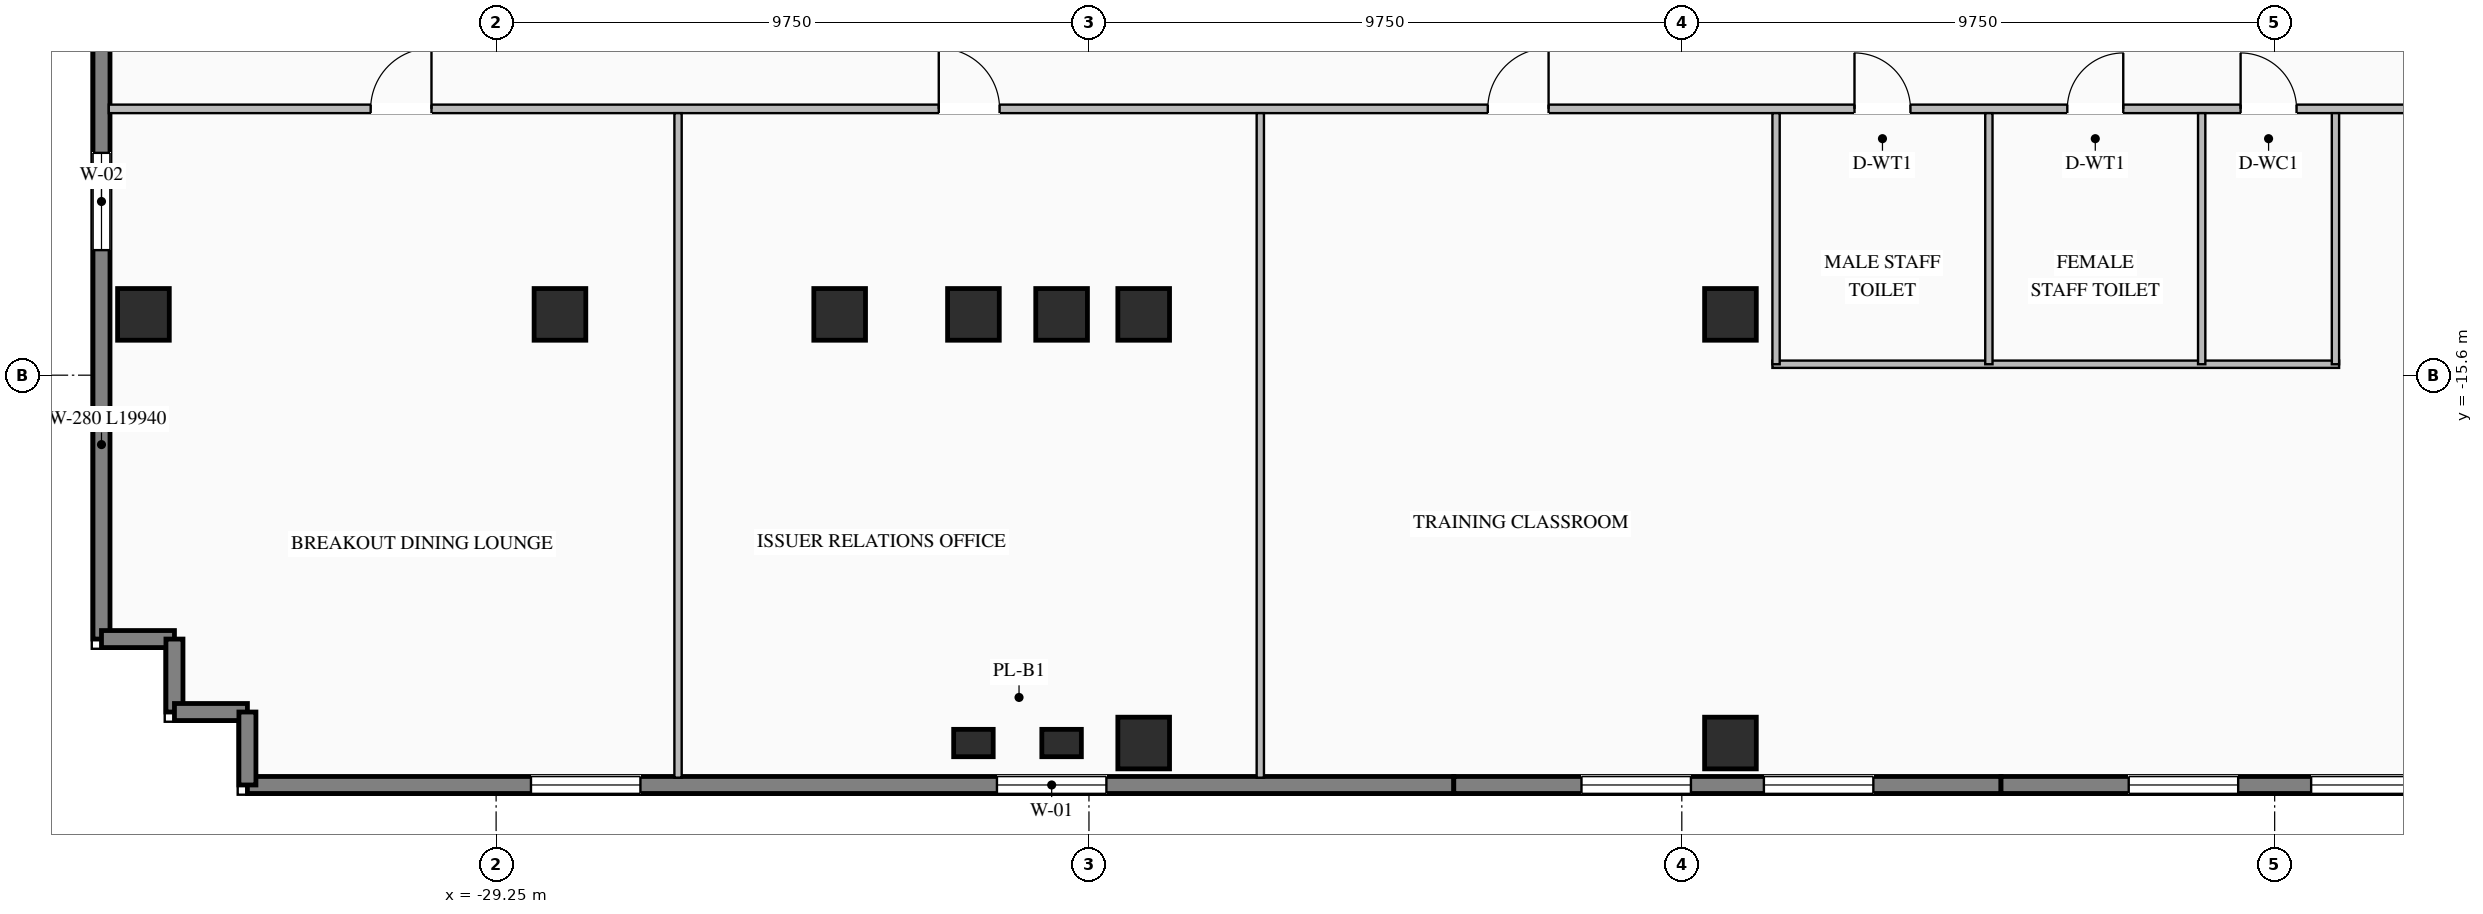
"""IFC4 building model, lengths in metres.
Left out: names, types, materials, properties, quantities, classifications, styles, units other than length and angle.
Written with IfcOpenShell. Run it as: python <this file> out.ifc"""

import sys

from ifc_helpers import new_model, si_unit, direction, frame, frame_2d, origin, origin_2d, place, context, subcontext, project, spatial, rectangle, i_section, extrude, element, fill, save


model = new_model("IFC4")
c1 = context("Model", 3, precision=1e-05, world=origin(), true_north=direction((0.0, 1.0)))
c2 = subcontext(c1, "Body", "Model", "MODEL_VIEW")
j1 = project(units=[si_unit("LENGTHUNIT", "METRE"), si_unit("PLANEANGLEUNIT", "RADIAN")], contexts=[c1])
p1 = place(None, origin())
s1 = spatial("IfcSite", under=j1, at=p1, CompositionType="ELEMENT")
p2 = place(p1, origin())
s2 = spatial("IfcBuilding", under=s1, at=p2, CompositionType="ELEMENT")
p3 = place(p2, frame((0.0, 0.0, 51.9)))
s3 = spatial("IfcBuildingStorey", under=s2, at=p3, CompositionType="ELEMENT", Elevation=51.9)
for number, where, z_axis, x_axis in (
    (1, (-21.4, -14.6, 0.0), (0.0, 0.0, 1.0), (1.0, 0.0, 0.0)),
    (2, (-19.95, -14.6, 0.0), (0.0, 0.0, 1.0), (1.0, 0.0, 0.0)),
    (3, (-18.6, -14.6, 0.0), (0.0, 0.0, 1.0), (1.0, 0.0, 0.0)),
    (4, (-8.95, -14.6, 0.0), (0.0, 0.0, 1.0), (1.0, 0.0, 0.0)),
    (5, (-23.6, -14.6, 0.0), (0.0, 0.0, 1.0), (1.0, 0.0, 0.0)),
    (6, (-28.2, -14.6, 0.0), (0.0, 0.0, 1.0), (1.0, 0.0, 0.0)),
    (7, (-18.6, -21.65, 0.0), (0.0, 0.0, 1.0), (1.0, 0.0, 0.0)),
    (8, (-8.95, -21.65, 0.0), (0.0, 0.0, 1.0), (1.0, 0.0, 0.0)),
    (9, (-35.05, -14.6, 0.0), (0.0, 0.0, 1.0), (1.0, 0.0, 0.0)),
):
    element("IfcColumn", number, at=place(p3, frame(where, z_axis=z_axis, x_axis=x_axis)), inside=s3, PredefinedType="COLUMN", context=c2, shape_type="SweptSolid", body=[
        extrude(i_section(OverallWidth=0.85, OverallDepth=0.85, WebThickness=0.032, FlangeThickness=0.048, at=origin_2d()), origin(), (0.0, 0.0, 1.0), 3.45),
    ])
for number, where, z_axis, x_axis in (
    (10, (-21.4, -21.65, 0.0), (0.0, 0.0, 1.0), (1.0, 0.0, 0.0)),
    (11, (-19.95, -21.65, 0.0), (0.0, 0.0, 1.0), (1.0, 0.0, 0.0)),
):
    element("IfcColumn", number, at=place(p3, frame(where, z_axis=z_axis, x_axis=x_axis)), inside=s3, PredefinedType="PILASTER", context=c2, shape_type="SweptSolid", body=[
        extrude(rectangle(XDim=0.65, YDim=0.45, at=origin_2d()), origin(), (0.0, 0.0, 1.0), 3.45),
    ])
p4 = place(p3, frame((-13.5, -22.34, 0.0), z_axis=(0.0, 0.0, 1.0), x_axis=(-1.0, 0.0, 0.0)))
e12 = element("IfcWall", 12, at=p4, inside=s3, PredefinedType="STANDARD", context=c2, shape_type="SweptSolid", body=[
    extrude(rectangle(XDim=19.84, YDim=0.28, at=frame_2d((9.92, 0.0))), origin(), (0.0, 0.0, 1.0), 3.25),
])
p5 = place(p4, frame((5.713, 0.0, 0.76)))
e13 = element("IfcOpeningElement", 13, at=p5, cuts=e12, PredefinedType="OPENING", context=c2, shape_type="SweptSolid", body=[
    extrude(rectangle(XDim=1.8, YDim=1.95, at=frame_2d((0.9, 0.975))), frame((0.0, 0.15, 0.0), z_axis=(0.0, -1.0, 0.0), x_axis=(1.0, 0.0, 0.0)), (0.0, 0.0, 1.0), 0.3),
])
p6 = place(p4, frame((13.377, 0.0, 0.76)))
e14 = element("IfcOpeningElement", 14, at=p6, cuts=e12, PredefinedType="OPENING", context=c2, shape_type="SweptSolid", body=[
    extrude(rectangle(XDim=1.8, YDim=1.95, at=frame_2d((0.9, 0.975))), frame((0.0, 0.15, 0.0), z_axis=(0.0, -1.0, 0.0), x_axis=(1.0, 0.0, 0.0)), (0.0, 0.0, 1.0), 0.3),
])
p7 = place(p3, frame((-4.5, -22.34, 0.0), z_axis=(0.0, 0.0, 1.0), x_axis=(-1.0, 0.0, 0.0)))
e15 = element("IfcWall", 15, at=p7, inside=s3, PredefinedType="STANDARD", context=c2, shape_type="SweptSolid", body=[
    extrude(rectangle(XDim=9.0, YDim=0.28, at=frame_2d((4.5, 0.0))), origin(), (0.0, 0.0, 1.0), 3.25),
])
p8 = place(p7, frame((2.1, 0.0, 0.76)))
e16 = element("IfcOpeningElement", 16, at=p8, cuts=e15, PredefinedType="OPENING", context=c2, shape_type="SweptSolid", body=[
    extrude(rectangle(XDim=1.8, YDim=1.95, at=frame_2d((0.9, 0.975))), frame((0.0, 0.15, 0.0), z_axis=(0.0, -1.0, 0.0), x_axis=(1.0, 0.0, 0.0)), (0.0, 0.0, 1.0), 0.3),
])
p9 = place(p7, frame((5.1, 0.0, 0.76)))
e17 = element("IfcOpeningElement", 17, at=p9, cuts=e15, PredefinedType="OPENING", context=c2, shape_type="SweptSolid", body=[
    extrude(rectangle(XDim=1.8, YDim=1.95, at=frame_2d((0.9, 0.975))), frame((0.0, 0.15, 0.0), z_axis=(0.0, -1.0, 0.0), x_axis=(1.0, 0.0, 0.0)), (0.0, 0.0, 1.0), 0.3),
])
p10 = place(p3, frame((4.5, -22.34, 0.0), z_axis=(0.0, 0.0, 1.0), x_axis=(-1.0, 0.0, 0.0)))
e18 = element("IfcWall", 18, at=p10, inside=s3, PredefinedType="STANDARD", context=c2, shape_type="SweptSolid", body=[
    extrude(rectangle(XDim=9.0, YDim=0.28, at=frame_2d((4.5, 0.0))), origin(), (0.0, 0.0, 1.0), 3.25),
])
p11 = place(p10, frame((2.1, 0.0, 0.76)))
e19 = element("IfcOpeningElement", 19, at=p11, cuts=e18, PredefinedType="OPENING", context=c2, shape_type="SweptSolid", body=[
    extrude(rectangle(XDim=1.8, YDim=1.95, at=frame_2d((0.9, 0.975))), frame((0.0, 0.15, 0.0), z_axis=(0.0, -1.0, 0.0), x_axis=(1.0, 0.0, 0.0)), (0.0, 0.0, 1.0), 0.3),
])
p12 = place(p10, frame((5.1, 0.0, 0.76)))
e20 = element("IfcOpeningElement", 20, at=p12, cuts=e18, PredefinedType="OPENING", context=c2, shape_type="SweptSolid", body=[
    extrude(rectangle(XDim=1.8, YDim=1.95, at=frame_2d((0.9, 0.975))), frame((0.0, 0.15, 0.0), z_axis=(0.0, -1.0, 0.0), x_axis=(1.0, 0.0, 0.0)), (0.0, 0.0, 1.0), 0.3),
])
p13 = place(p3, frame((-35.74, -19.94, 0.0), z_axis=(0.0, 0.0, 1.0), x_axis=(0.0, 1.0, 0.0)))
e21 = element("IfcWall", 21, at=p13, inside=s3, PredefinedType="STANDARD", context=c2, shape_type="SweptSolid", body=[
    extrude(rectangle(XDim=19.94, YDim=0.28, at=frame_2d((9.97, 0.0))), origin(), (0.0, 0.0, 1.0), 3.25),
])
p14 = place(p13, frame((6.397, 0.0, 0.76)))
e22 = element("IfcOpeningElement", 22, at=p14, cuts=e21, PredefinedType="OPENING", context=c2, shape_type="SweptSolid", body=[
    extrude(rectangle(XDim=1.6, YDim=1.95, at=frame_2d((0.8, 0.975))), frame((0.0, 0.15, 0.0), z_axis=(0.0, -1.0, 0.0), x_axis=(1.0, 0.0, 0.0)), (0.0, 0.0, 1.0), 0.3),
])
p15 = place(p13, frame((12.493, 0.0, 0.76)))
e23 = element("IfcOpeningElement", 23, at=p15, cuts=e21, PredefinedType="OPENING", context=c2, shape_type="SweptSolid", body=[
    extrude(rectangle(XDim=1.6, YDim=1.95, at=frame_2d((0.8, 0.975))), frame((0.0, 0.15, 0.0), z_axis=(0.0, -1.0, 0.0), x_axis=(1.0, 0.0, 0.0)), (0.0, 0.0, 1.0), 0.3),
])
for number, where, z_axis, x_axis in (
    (24, (-35.74, -19.94, 0.0), (0.0, 0.0, 1.0), (1.0, 0.0, 0.0)),
    (25, (-34.54, -19.94, 0.0), (0.0, 0.0, 1.0), (0.0, -1.0, 0.0)),
    (26, (-34.54, -21.14, 0.0), (0.0, 0.0, 1.0), (1.0, 0.0, 0.0)),
):
    element("IfcWall", number, at=place(p3, frame(where, z_axis=z_axis, x_axis=x_axis)), inside=s3, PredefinedType="STANDARD", context=c2, shape_type="SweptSolid", body=[
        extrude(rectangle(XDim=1.2, YDim=0.28, at=frame_2d((0.6, 0.0))), origin(), (0.0, 0.0, 1.0), 3.25),
    ])
p16 = place(p3, frame((-33.34, -21.14, 0.0), z_axis=(0.0, 0.0, 1.0), x_axis=(0.0, -1.0, 0.0)))
e27 = element("IfcWall", 27, at=p16, inside=s3, PredefinedType="STANDARD", context=c2, shape_type="SweptSolid", body=[
    extrude(rectangle(XDim=1.2, YDim=0.28, at=frame_2d((0.6, 0.0))), origin(), (0.0, 0.0, 1.0), 3.25),
])
p17 = place(p3, frame((-35.62, -11.22, 0.0), z_axis=(0.0, 0.0, 1.0), x_axis=(1.0, 0.0, 0.0)))
e28 = element("IfcWall", 28, at=p17, inside=s3, PredefinedType="STANDARD", context=c2, shape_type="SweptSolid", body=[
    extrude(rectangle(XDim=71.24, YDim=0.14, at=frame_2d((35.62, 0.0))), origin(), (0.0, 0.0, 1.0), 2.745),
])
p18 = place(p17, frame((28.71, 0.0, 0.0)))
e29 = element("IfcOpeningElement", 29, at=p18, cuts=e28, PredefinedType="OPENING", context=c2, shape_type="SweptSolid", body=[
    extrude(rectangle(XDim=0.92, YDim=2.08, at=frame_2d((0.46, 1.04))), frame((0.0, 0.08, 0.0), z_axis=(0.0, -1.0, 0.0), x_axis=(1.0, 0.0, 0.0)), (0.0, 0.0, 1.0), 0.16),
])
p19 = place(p17, frame((32.21, 0.0, 0.0)))
e30 = element("IfcOpeningElement", 30, at=p19, cuts=e28, PredefinedType="OPENING", context=c2, shape_type="SweptSolid", body=[
    extrude(rectangle(XDim=0.92, YDim=2.08, at=frame_2d((0.46, 1.04))), frame((0.0, 0.08, 0.0), z_axis=(0.0, -1.0, 0.0), x_axis=(1.0, 0.0, 0.0)), (0.0, 0.0, 1.0), 0.16),
])
p20 = place(p17, frame((35.06, 0.0, 0.0)))
e31 = element("IfcOpeningElement", 31, at=p20, cuts=e28, PredefinedType="OPENING", context=c2, shape_type="SweptSolid", body=[
    extrude(rectangle(XDim=0.92, YDim=2.08, at=frame_2d((0.46, 1.04))), frame((0.0, 0.08, 0.0), z_axis=(0.0, -1.0, 0.0), x_axis=(1.0, 0.0, 0.0)), (0.0, 0.0, 1.0), 0.16),
])
p21 = place(p17, frame((4.307, 0.0, 0.0)))
e32 = element("IfcOpeningElement", 32, at=p21, cuts=e28, PredefinedType="OPENING", context=c2, shape_type="SweptSolid", body=[
    extrude(rectangle(XDim=1.0, YDim=2.08, at=frame_2d((0.5, 1.04))), frame((0.0, 0.08, 0.0), z_axis=(0.0, -1.0, 0.0), x_axis=(1.0, 0.0, 0.0)), (0.0, 0.0, 1.0), 0.16),
])
p22 = place(p17, frame((13.65, 0.0, 0.0)))
e33 = element("IfcOpeningElement", 33, at=p22, cuts=e28, PredefinedType="OPENING", context=c2, shape_type="SweptSolid", body=[
    extrude(rectangle(XDim=1.0, YDim=2.08, at=frame_2d((0.5, 1.04))), frame((0.0, 0.08, 0.0), z_axis=(0.0, -1.0, 0.0), x_axis=(1.0, 0.0, 0.0)), (0.0, 0.0, 1.0), 0.16),
])
p23 = place(p17, frame((22.679, 0.0, 0.0)))
e34 = element("IfcOpeningElement", 34, at=p23, cuts=e28, PredefinedType="OPENING", context=c2, shape_type="SweptSolid", body=[
    extrude(rectangle(XDim=1.0, YDim=2.08, at=frame_2d((0.5, 1.04))), frame((0.0, 0.08, 0.0), z_axis=(0.0, -1.0, 0.0), x_axis=(1.0, 0.0, 0.0)), (0.0, 0.0, 1.0), 0.16),
])
p24 = place(p17, frame((41.995, 0.0, 0.0)))
e35 = element("IfcOpeningElement", 35, at=p24, cuts=e28, PredefinedType="OPENING", context=c2, shape_type="SweptSolid", body=[
    extrude(rectangle(XDim=1.0, YDim=2.08, at=frame_2d((0.5, 1.04))), frame((0.0, 0.08, 0.0), z_axis=(0.0, -1.0, 0.0), x_axis=(1.0, 0.0, 0.0)), (0.0, 0.0, 1.0), 0.16),
])
p25 = place(p17, frame((53.918, 0.0, 0.0)))
e36 = element("IfcOpeningElement", 36, at=p25, cuts=e28, PredefinedType="OPENING", context=c2, shape_type="SweptSolid", body=[
    extrude(rectangle(XDim=1.0, YDim=2.08, at=frame_2d((0.5, 1.04))), frame((0.0, 0.08, 0.0), z_axis=(0.0, -1.0, 0.0), x_axis=(1.0, 0.0, 0.0)), (0.0, 0.0, 1.0), 0.16),
])
p26 = place(p17, frame((65.227, 0.0, 0.0)))
e37 = element("IfcOpeningElement", 37, at=p26, cuts=e28, PredefinedType="OPENING", context=c2, shape_type="SweptSolid", body=[
    extrude(rectangle(XDim=1.0, YDim=2.08, at=frame_2d((0.5, 1.04))), frame((0.0, 0.08, 0.0), z_axis=(0.0, -1.0, 0.0), x_axis=(1.0, 0.0, 0.0)), (0.0, 0.0, 1.0), 0.16),
])
p27 = place(p3, frame((-8.26, -15.42, 0.0), z_axis=(0.0, 0.0, 1.0), x_axis=(1.0, 0.0, 0.0)))
e38 = element("IfcWall", 38, at=p27, inside=s3, PredefinedType="STANDARD", context=c2, shape_type="SweptSolid", body=[
    extrude(rectangle(XDim=9.32, YDim=0.12, at=frame_2d((4.66, 0.0))), origin(), (0.0, 0.0, 1.0), 3.25),
])
for number, where, z_axis, x_axis in (
    (39, (-8.2, -15.42, 0.0), (0.0, 0.0, 1.0), (0.0, 1.0, 0.0)),
    (40, (-4.7, -15.42, 0.0), (0.0, 0.0, 1.0), (0.0, 1.0, 0.0)),
    (41, (-1.2, -15.42, 0.0), (0.0, 0.0, 1.0), (0.0, 1.0, 0.0)),
    (42, (1.0, -15.42, 0.0), (0.0, 0.0, 1.0), (0.0, 1.0, 0.0)),
):
    element("IfcWall", number, at=place(p3, frame(where, z_axis=z_axis, x_axis=x_axis)), inside=s3, PredefinedType="STANDARD", context=c2, shape_type="SweptSolid", body=[
        extrude(rectangle(XDim=4.13, YDim=0.12, at=frame_2d((2.065, 0.0))), origin(), (0.0, 0.0, 1.0), 3.25),
    ])
for number, where, z_axis, x_axis in (
    (43, (-26.258, -22.22, 0.0), (0.0, 0.0, 1.0), (0.0, 1.0, 0.0)),
    (44, (-16.682, -22.22, 0.0), (0.0, 0.0, 1.0), (0.0, 1.0, 0.0)),
):
    element("IfcWall", number, at=place(p3, frame(where, z_axis=z_axis, x_axis=x_axis)), inside=s3, PredefinedType="STANDARD", context=c2, shape_type="SweptSolid", body=[
        extrude(rectangle(XDim=10.93, YDim=0.12, at=frame_2d((5.465, 0.0))), origin(), (0.0, 0.0, 1.0), 3.25),
    ])
p28 = place(p5, origin())
e45 = element("IfcWindow", 45, at=p28, inside=s3, PartitioningType="SINGLE_PANEL", PredefinedType="WINDOW", context=c2, shape_type="SweptSolid", body=[
    extrude(rectangle(XDim=1.8, YDim=1.95, at=frame_2d((0.9, 0.975))), frame((0.0, 0.03, 0.0), z_axis=(0.0, -1.0, 0.0), x_axis=(1.0, 0.0, 0.0)), (0.0, 0.0, 1.0), 0.06),
])
fill(e13, e45)
p29 = place(p6, origin())
e46 = element("IfcWindow", 46, at=p29, inside=s3, PartitioningType="SINGLE_PANEL", PredefinedType="WINDOW", context=c2, shape_type="SweptSolid", body=[
    extrude(rectangle(XDim=1.8, YDim=1.95, at=frame_2d((0.9, 0.975))), frame((0.0, 0.03, 0.0), z_axis=(0.0, -1.0, 0.0), x_axis=(1.0, 0.0, 0.0)), (0.0, 0.0, 1.0), 0.06),
])
fill(e14, e46)
p30 = place(p8, origin())
e47 = element("IfcWindow", 47, at=p30, inside=s3, PartitioningType="SINGLE_PANEL", PredefinedType="WINDOW", context=c2, shape_type="SweptSolid", body=[
    extrude(rectangle(XDim=1.8, YDim=1.95, at=frame_2d((0.9, 0.975))), frame((0.0, 0.03, 0.0), z_axis=(0.0, -1.0, 0.0), x_axis=(1.0, 0.0, 0.0)), (0.0, 0.0, 1.0), 0.06),
])
fill(e16, e47)
p31 = place(p9, origin())
e48 = element("IfcWindow", 48, at=p31, inside=s3, PartitioningType="SINGLE_PANEL", PredefinedType="WINDOW", context=c2, shape_type="SweptSolid", body=[
    extrude(rectangle(XDim=1.8, YDim=1.95, at=frame_2d((0.9, 0.975))), frame((0.0, 0.03, 0.0), z_axis=(0.0, -1.0, 0.0), x_axis=(1.0, 0.0, 0.0)), (0.0, 0.0, 1.0), 0.06),
])
fill(e17, e48)
p32 = place(p11, origin())
e49 = element("IfcWindow", 49, at=p32, inside=s3, PartitioningType="SINGLE_PANEL", PredefinedType="WINDOW", context=c2, shape_type="SweptSolid", body=[
    extrude(rectangle(XDim=1.8, YDim=1.95, at=frame_2d((0.9, 0.975))), frame((0.0, 0.03, 0.0), z_axis=(0.0, -1.0, 0.0), x_axis=(1.0, 0.0, 0.0)), (0.0, 0.0, 1.0), 0.06),
])
fill(e19, e49)
p33 = place(p12, origin())
e50 = element("IfcWindow", 50, at=p33, inside=s3, PartitioningType="SINGLE_PANEL", PredefinedType="WINDOW", context=c2, shape_type="SweptSolid", body=[
    extrude(rectangle(XDim=1.8, YDim=1.95, at=frame_2d((0.9, 0.975))), frame((0.0, 0.03, 0.0), z_axis=(0.0, -1.0, 0.0), x_axis=(1.0, 0.0, 0.0)), (0.0, 0.0, 1.0), 0.06),
])
fill(e20, e50)
p34 = place(p14, origin())
e51 = element("IfcWindow", 51, at=p34, inside=s3, PartitioningType="SINGLE_PANEL", PredefinedType="WINDOW", context=c2, shape_type="SweptSolid", body=[
    extrude(rectangle(XDim=1.6, YDim=1.95, at=frame_2d((0.8, 0.975))), frame((0.0, 0.03, 0.0), z_axis=(0.0, -1.0, 0.0), x_axis=(1.0, 0.0, 0.0)), (0.0, 0.0, 1.0), 0.06),
])
fill(e22, e51)
p35 = place(p18, origin())
e52 = element("IfcDoor", 52, at=p35, inside=s3, OperationType="SINGLE_SWING_LEFT", PredefinedType="DOOR", context=c2, shape_type="SweptSolid", body=[
    extrude(rectangle(XDim=0.92, YDim=2.08, at=frame_2d((0.46, 1.04))), frame((0.0, 0.025, 0.0), z_axis=(0.0, -1.0, 0.0), x_axis=(1.0, 0.0, 0.0)), (0.0, 0.0, 1.0), 0.05),
])
fill(e29, e52)
p36 = place(p19, origin())
e53 = element("IfcDoor", 53, at=p36, inside=s3, OperationType="SINGLE_SWING_RIGHT", PredefinedType="DOOR", context=c2, shape_type="SweptSolid", body=[
    extrude(rectangle(XDim=0.92, YDim=2.08, at=frame_2d((0.46, 1.04))), frame((0.0, 0.025, 0.0), z_axis=(0.0, -1.0, 0.0), x_axis=(1.0, 0.0, 0.0)), (0.0, 0.0, 1.0), 0.05),
])
fill(e30, e53)
p37 = place(p20, origin())
e54 = element("IfcDoor", 54, at=p37, inside=s3, OperationType="SINGLE_SWING_LEFT", PredefinedType="DOOR", context=c2, shape_type="SweptSolid", body=[
    extrude(rectangle(XDim=0.92, YDim=2.08, at=frame_2d((0.46, 1.04))), frame((0.0, 0.025, 0.0), z_axis=(0.0, -1.0, 0.0), x_axis=(1.0, 0.0, 0.0)), (0.0, 0.0, 1.0), 0.05),
])
fill(e31, e54)
p38 = place(p21, origin())
e55 = element("IfcDoor", 55, at=p38, inside=s3, OperationType="SINGLE_SWING_RIGHT", PredefinedType="DOOR", context=c2, shape_type="SweptSolid", body=[
    extrude(rectangle(XDim=1.0, YDim=2.08, at=frame_2d((0.5, 1.04))), frame((0.0, 0.025, 0.0), z_axis=(0.0, -1.0, 0.0), x_axis=(1.0, 0.0, 0.0)), (0.0, 0.0, 1.0), 0.05),
])
fill(e32, e55)
p39 = place(p22, origin())
e56 = element("IfcDoor", 56, at=p39, inside=s3, OperationType="SINGLE_SWING_LEFT", PredefinedType="DOOR", context=c2, shape_type="SweptSolid", body=[
    extrude(rectangle(XDim=1.0, YDim=2.08, at=frame_2d((0.5, 1.04))), frame((0.0, 0.025, 0.0), z_axis=(0.0, -1.0, 0.0), x_axis=(1.0, 0.0, 0.0)), (0.0, 0.0, 1.0), 0.05),
])
fill(e33, e56)
p40 = place(p23, origin())
e57 = element("IfcDoor", 57, at=p40, inside=s3, OperationType="SINGLE_SWING_RIGHT", PredefinedType="DOOR", context=c2, shape_type="SweptSolid", body=[
    extrude(rectangle(XDim=1.0, YDim=2.08, at=frame_2d((0.5, 1.04))), frame((0.0, 0.025, 0.0), z_axis=(0.0, -1.0, 0.0), x_axis=(1.0, 0.0, 0.0)), (0.0, 0.0, 1.0), 0.05),
])
fill(e34, e57)
save(model, sys.argv[1])
